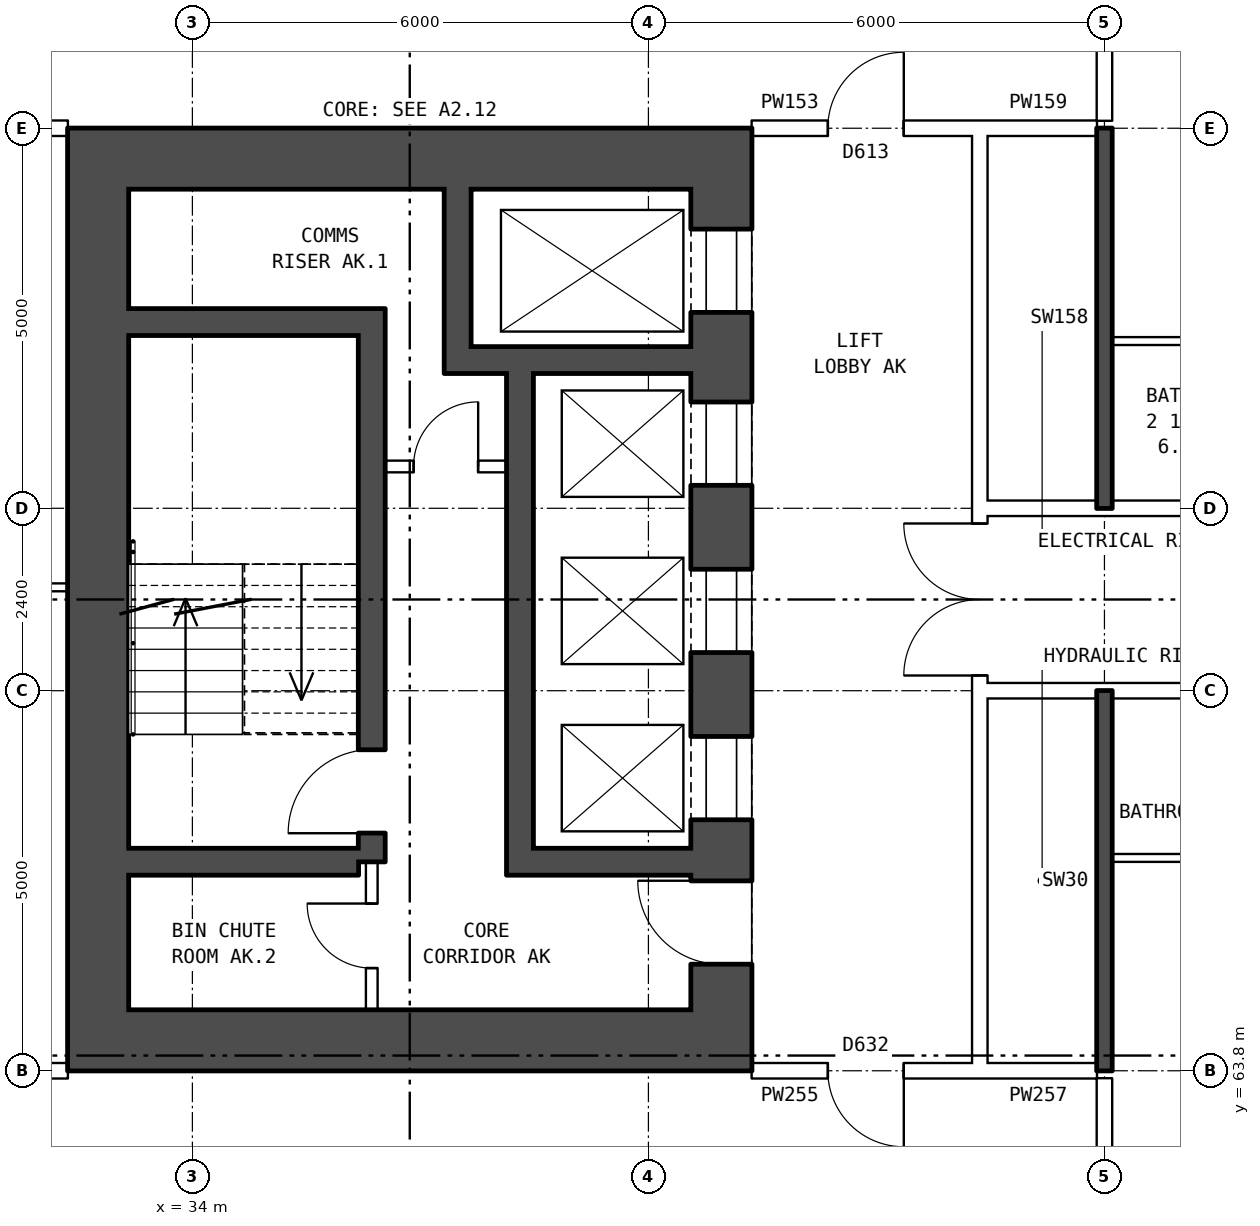
"""IFC4 building model, lengths in metres.
Left out: names, types, materials, properties, quantities, classifications, styles, units other than length and angle.
Written with IfcOpenShell. Run it as: python <this file> out.ifc"""

import sys

from ifc_helpers import new_model, si_unit, direction, frame, frame_2d, origin, place, context, subcontext, project, spatial, rectangle, extrude, element, fill, save


model = new_model("IFC4")
c1 = context("Model", 3, precision=1e-05, world=origin(), true_north=direction((0.0, 1.0)))
c2 = subcontext(c1, "Body", "Model", "MODEL_VIEW")
j1 = project(units=[si_unit("LENGTHUNIT", "METRE"), si_unit("PLANEANGLEUNIT", "RADIAN")], contexts=[c1])
p1 = place(None, origin())
s1 = spatial("IfcSite", under=j1, at=p1, CompositionType="ELEMENT")
p2 = place(p1, origin())
s2 = spatial("IfcBuilding", under=s1, at=p2, CompositionType="ELEMENT")
p3 = place(p2, frame((0.0, 0.0, 44.3)))
s3 = spatial("IfcBuildingStorey", under=s2, at=p3, CompositionType="ELEMENT", Elevation=44.3)
p4 = place(p3, frame((40.96, 75.4, 0.0), z_axis=(0.0, 0.0, 1.0), x_axis=(0.0, -1.0, 0.0)))
e1 = element("IfcWall", 1, at=p4, inside=s3, PredefinedType="SHEAR", context=c2, shape_type="SweptSolid", body=[
    extrude(rectangle(XDim=10.8, YDim=0.8, at=frame_2d((5.4, 0.0))), origin(), (0.0, 0.0, 1.0), 2.85),
])
p5 = place(p4, frame((0.525, 0.0, 0.0)))
e2 = element("IfcOpeningElement", 2, at=p5, cuts=e1, PredefinedType="OPENING", context=c2, shape_type="SweptSolid", body=[
    extrude(rectangle(XDim=1.1, YDim=2.1, at=frame_2d((0.55, 1.05))), frame((0.0, 0.41, 0.0), z_axis=(0.0, -1.0, 0.0), x_axis=(1.0, 0.0, 0.0)), (0.0, 0.0, 1.0), 0.82),
])
p6 = place(p4, frame((2.8, 0.0, 0.0)))
e3 = element("IfcOpeningElement", 3, at=p6, cuts=e1, PredefinedType="OPENING", context=c2, shape_type="SweptSolid", body=[
    extrude(rectangle(XDim=1.1, YDim=2.1, at=frame_2d((0.55, 1.05))), frame((0.0, 0.41, 0.0), z_axis=(0.0, -1.0, 0.0), x_axis=(1.0, 0.0, 0.0)), (0.0, 0.0, 1.0), 0.82),
])
p7 = place(p4, frame((5.0, 0.0, 0.0)))
e4 = element("IfcOpeningElement", 4, at=p7, cuts=e1, PredefinedType="OPENING", context=c2, shape_type="SweptSolid", body=[
    extrude(rectangle(XDim=1.1, YDim=2.1, at=frame_2d((0.55, 1.05))), frame((0.0, 0.41, 0.0), z_axis=(0.0, -1.0, 0.0), x_axis=(1.0, 0.0, 0.0)), (0.0, 0.0, 1.0), 0.82),
])
p8 = place(p4, frame((7.2, 0.0, 0.0)))
e5 = element("IfcOpeningElement", 5, at=p8, cuts=e1, PredefinedType="OPENING", context=c2, shape_type="SweptSolid", body=[
    extrude(rectangle(XDim=1.1, YDim=2.1, at=frame_2d((0.55, 1.05))), frame((0.0, 0.41, 0.0), z_axis=(0.0, -1.0, 0.0), x_axis=(1.0, 0.0, 0.0)), (0.0, 0.0, 1.0), 0.82),
])
p9 = place(p4, frame((9.1, 0.0, 0.0)))
e6 = element("IfcOpeningElement", 6, at=p9, cuts=e1, PredefinedType="OPENING", context=c2, shape_type="SweptSolid", body=[
    extrude(rectangle(XDim=1.1, YDim=2.1, at=frame_2d((0.55, 1.05))), frame((0.0, 0.41, 0.0), z_axis=(0.0, -1.0, 0.0), x_axis=(1.0, 0.0, 0.0)), (0.0, 0.0, 1.0), 0.82),
])
p10 = place(p3, frame((32.76, 75.4, 0.0), z_axis=(0.0, 0.0, 1.0), x_axis=(0.0, -1.0, 0.0)))
e7 = element("IfcWall", 7, at=p10, inside=s3, PredefinedType="SHEAR", context=c2, shape_type="SweptSolid", body=[
    extrude(rectangle(XDim=10.8, YDim=0.8, at=frame_2d((5.4, 0.0))), origin(), (0.0, 0.0, 1.0), 2.85),
])
for number, where, z_axis, x_axis in (
    (8, (41.36, 75.8, 0.0), (0.0, 0.0, 1.0), (-1.0, 0.0, 0.0)),
    (9, (41.36, 64.2, 0.0), (0.0, 0.0, 1.0), (-1.0, 0.0, 0.0)),
):
    element("IfcWall", number, at=place(p3, frame(where, z_axis=z_axis, x_axis=x_axis)), inside=s3, PredefinedType="SHEAR", context=c2, shape_type="SweptSolid", body=[
        extrude(rectangle(XDim=9.0, YDim=0.8, at=frame_2d((4.5, 0.0))), origin(), (0.0, 0.0, 1.0), 2.85),
    ])
p11 = place(p3, frame((36.185, 73.65, 0.0), z_axis=(0.0, 0.0, 1.0), x_axis=(-1.0, 0.0, 0.0)))
e10 = element("IfcWall", 10, at=p11, inside=s3, PredefinedType="SHEAR", context=c2, shape_type="SweptSolid", body=[
    extrude(rectangle(XDim=3.025, YDim=0.35, at=frame_2d((1.513, 0.0))), origin(), (0.0, 0.0, 1.0), 2.85),
])
p12 = place(p3, frame((40.56, 73.15, 0.0), z_axis=(0.0, 0.0, 1.0), x_axis=(-1.0, 0.0, 0.0)))
e11 = element("IfcWall", 11, at=p12, inside=s3, PredefinedType="SHEAR", context=c2, shape_type="SweptSolid", body=[
    extrude(rectangle(XDim=3.245, YDim=0.35, at=frame_2d((1.623, 0.0))), origin(), (0.0, 0.0, 1.0), 2.85),
])
p13 = place(p3, frame((38.135, 71.75, 0.0), z_axis=(0.0, 0.0, 1.0), x_axis=(-1.0, 0.0, 0.0)))
e12 = element("IfcWall", 12, at=p13, inside=s3, PredefinedType="PARTITIONING", context=c2, shape_type="SweptSolid", body=[
    extrude(rectangle(XDim=1.6, YDim=0.15, at=frame_2d((0.8, 0.0))), origin(), (0.0, 0.0, 1.0), 2.85),
])
p14 = place(p13, frame((0.375, 0.0, 0.0)))
e13 = element("IfcOpeningElement", 13, at=p14, cuts=e12, PredefinedType="OPENING", context=c2, shape_type="SweptSolid", body=[
    extrude(rectangle(XDim=0.85, YDim=2.1, at=frame_2d((0.425, 1.05))), frame((0.0, 0.085, 0.0), z_axis=(0.0, -1.0, 0.0), x_axis=(1.0, 0.0, 0.0)), (0.0, 0.0, 1.0), 0.17),
])
p15 = place(p3, frame((40.56, 66.55, 0.0), z_axis=(0.0, 0.0, 1.0), x_axis=(-1.0, 0.0, 0.0)))
e14 = element("IfcWall", 14, at=p15, inside=s3, PredefinedType="SHEAR", context=c2, shape_type="SweptSolid", body=[
    extrude(rectangle(XDim=2.075, YDim=0.35, at=frame_2d((1.038, 0.0))), origin(), (0.0, 0.0, 1.0), 2.85),
])
p16 = place(p3, frame((36.185, 66.55, 0.0), z_axis=(0.0, 0.0, 1.0), x_axis=(-1.0, 0.0, 0.0)))
e15 = element("IfcWall", 15, at=p16, inside=s3, PredefinedType="SHEAR", context=c2, shape_type="SweptSolid", body=[
    extrude(rectangle(XDim=3.025, YDim=0.35, at=frame_2d((1.513, 0.0))), origin(), (0.0, 0.0, 1.0), 2.85),
])
p17 = place(p3, frame((38.31, 72.975, 0.0), z_axis=(0.0, 0.0, 1.0), x_axis=(0.0, -1.0, 0.0)))
e16 = element("IfcWall", 16, at=p17, inside=s3, PredefinedType="SHEAR", context=c2, shape_type="SweptSolid", body=[
    extrude(rectangle(XDim=6.6, YDim=0.35, at=frame_2d((3.3, 0.0))), origin(), (0.0, 0.0, 1.0), 2.85),
])
p18 = place(p3, frame((37.49, 75.4, 0.0), z_axis=(0.0, 0.0, 1.0), x_axis=(0.0, -1.0, 0.0)))
e17 = element("IfcWall", 17, at=p18, inside=s3, PredefinedType="SHEAR", context=c2, shape_type="SweptSolid", body=[
    extrude(rectangle(XDim=2.075, YDim=0.35, at=frame_2d((1.038, 0.0))), origin(), (0.0, 0.0, 1.0), 2.85),
])
p19 = place(p3, frame((36.36, 73.825, 0.0), z_axis=(0.0, 0.0, 1.0), x_axis=(0.0, -1.0, 0.0)))
e18 = element("IfcWall", 18, at=p19, inside=s3, PredefinedType="SHEAR", context=c2, shape_type="SweptSolid", body=[
    extrude(rectangle(XDim=7.275, YDim=0.35, at=frame_2d((3.637, 0.0))), origin(), (0.0, 0.0, 1.0), 2.85),
])
p20 = place(p19, frame((5.8, 0.0, 0.0)))
e19 = element("IfcOpeningElement", 19, at=p20, cuts=e18, PredefinedType="OPENING", context=c2, shape_type="SweptSolid", body=[
    extrude(rectangle(XDim=1.1, YDim=2.1, at=frame_2d((0.55, 1.05))), frame((0.0, 0.185, 0.0), z_axis=(0.0, -1.0, 0.0), x_axis=(1.0, 0.0, 0.0)), (0.0, 0.0, 1.0), 0.37),
])
p21 = place(p3, frame((36.36, 66.55, 0.0), z_axis=(0.0, 0.0, 1.0), x_axis=(0.0, -1.0, 0.0)))
e20 = element("IfcWall", 20, at=p21, inside=s3, PredefinedType="PARTITIONING", context=c2, shape_type="SweptSolid", body=[
    extrude(rectangle(XDim=1.95, YDim=0.15, at=frame_2d((0.975, 0.0))), origin(), (0.0, 0.0, 1.0), 2.85),
])
p22 = place(p21, frame((0.55, 0.0, 0.0)))
e21 = element("IfcOpeningElement", 21, at=p22, cuts=e20, PredefinedType="OPENING", context=c2, shape_type="SweptSolid", body=[
    extrude(rectangle(XDim=0.85, YDim=2.1, at=frame_2d((0.425, 1.05))), frame((0.0, 0.085, 0.0), z_axis=(0.0, -1.0, 0.0), x_axis=(1.0, 0.0, 0.0)), (0.0, 0.0, 1.0), 0.17),
])
p23 = place(p3, frame((44.36, 63.9, 0.0), z_axis=(0.0, 0.0, 1.0), x_axis=(0.0, 1.0, 0.0)))
e22 = element("IfcWall", 22, at=p23, inside=s3, PredefinedType="PARTITIONING", context=c2, shape_type="SweptSolid", body=[
    extrude(rectangle(XDim=12.2, YDim=0.2, at=frame_2d((6.1, 0.0))), origin(), (0.0, 0.0, 1.0), 2.85),
])
p24 = place(p23, frame((5.1, 0.0, 0.0)))
e23 = element("IfcOpeningElement", 23, at=p24, cuts=e22, PredefinedType="OPENING", context=c2, shape_type="SweptSolid", body=[
    extrude(rectangle(XDim=2.0, YDim=2.1, at=frame_2d((1.0, 1.05))), frame((0.0, 0.11, 0.0), z_axis=(0.0, -1.0, 0.0), x_axis=(1.0, 0.0, 0.0)), (0.0, 0.0, 1.0), 0.22),
])
p25 = place(p3, frame((24.26, 63.8, 0.0), z_axis=(0.0, 0.0, 1.0), x_axis=(1.0, 0.0, 0.0)))
e24 = element("IfcWall", 24, at=p25, inside=s3, PredefinedType="PARTITIONING", context=c2, shape_type="SweptSolid", body=[
    extrude(rectangle(XDim=8.1, YDim=0.2, at=frame_2d((4.05, 0.0))), origin(), (0.0, 0.0, 1.0), 2.85),
])
p26 = place(p25, frame((5.52, 0.0, 0.0)))
e25 = element("IfcOpeningElement", 25, at=p26, cuts=e24, PredefinedType="OPENING", context=c2, shape_type="SweptSolid", body=[
    extrude(rectangle(XDim=0.8, YDim=2.1, at=frame_2d((0.4, 1.05))), frame((0.0, 0.11, 0.0), z_axis=(0.0, -1.0, 0.0), x_axis=(1.0, 0.0, 0.0)), (0.0, 0.0, 1.0), 0.22),
])
p27 = place(p3, frame((41.36, 63.8, 0.0), z_axis=(0.0, 0.0, 1.0), x_axis=(1.0, 0.0, 0.0)))
e26 = element("IfcWall", 26, at=p27, inside=s3, PredefinedType="PARTITIONING", context=c2, shape_type="SweptSolid", body=[
    extrude(rectangle(XDim=3.0, YDim=0.2, at=frame_2d((1.5, 0.0))), origin(), (0.0, 0.0, 1.0), 2.85),
])
p28 = place(p27, frame((1.0, 0.0, 0.0)))
e27 = element("IfcOpeningElement", 27, at=p28, cuts=e26, PredefinedType="OPENING", context=c2, shape_type="SweptSolid", body=[
    extrude(rectangle(XDim=1.0, YDim=2.1, at=frame_2d((0.5, 1.05))), frame((0.0, 0.11, 0.0), z_axis=(0.0, -1.0, 0.0), x_axis=(1.0, 0.0, 0.0)), (0.0, 0.0, 1.0), 0.22),
])
p29 = place(p3, frame((44.36, 63.8, 0.0), z_axis=(0.0, 0.0, 1.0), x_axis=(1.0, 0.0, 0.0)))
e28 = element("IfcWall", 28, at=p29, inside=s3, PredefinedType="PARTITIONING", context=c2, shape_type="SweptSolid", body=[
    extrude(rectangle(XDim=1.54, YDim=0.2, at=frame_2d((0.77, 0.0))), origin(), (0.0, 0.0, 1.0), 2.85),
])
p30 = place(p3, frame((46.1, 66.6, 0.0), z_axis=(0.0, 0.0, 1.0), x_axis=(1.0, 0.0, 0.0)))
e29 = element("IfcWall", 29, at=p30, inside=s3, PredefinedType="PARTITIONING", context=c2, shape_type="SweptSolid", body=[
    extrude(rectangle(XDim=2.9, YDim=0.1, at=frame_2d((1.45, 0.0))), origin(), (0.0, 0.0, 1.0), 2.85),
])
p31 = place(p3, frame((44.36, 68.8, 0.0), z_axis=(0.0, 0.0, 1.0), x_axis=(1.0, 0.0, 0.0)))
e30 = element("IfcWall", 30, at=p31, inside=s3, PredefinedType="PARTITIONING", context=c2, shape_type="SweptSolid", body=[
    extrude(rectangle(XDim=19.28, YDim=0.2, at=frame_2d((9.64, 0.0))), origin(), (0.0, 0.0, 1.0), 2.85),
])
p32 = place(p31, frame((14.64, 0.0, 0.0)))
e31 = element("IfcOpeningElement", 31, at=p32, cuts=e30, PredefinedType="OPENING", context=c2, shape_type="SweptSolid", body=[
    extrude(rectangle(XDim=1.0, YDim=2.1, at=frame_2d((0.5, 1.05))), frame((0.0, 0.11, 0.0), z_axis=(0.0, -1.0, 0.0), x_axis=(1.0, 0.0, 0.0)), (0.0, 0.0, 1.0), 0.22),
])
p33 = place(p31, frame((5.64, 0.0, 0.0)))
e32 = element("IfcOpeningElement", 32, at=p33, cuts=e30, PredefinedType="OPENING", context=c2, shape_type="SweptSolid", body=[
    extrude(rectangle(XDim=1.0, YDim=2.1, at=frame_2d((0.5, 1.05))), frame((0.0, 0.11, 0.0), z_axis=(0.0, -1.0, 0.0), x_axis=(1.0, 0.0, 0.0)), (0.0, 0.0, 1.0), 0.22),
])
p34 = place(p3, frame((28.1, 70.16, 0.0), z_axis=(0.0, 0.0, 1.0), x_axis=(1.0, 0.0, 0.0)))
e33 = element("IfcWall", 33, at=p34, inside=s3, PredefinedType="PARTITIONING", context=c2, shape_type="SweptSolid", body=[
    extrude(rectangle(XDim=4.26, YDim=0.1, at=frame_2d((2.13, 0.0))), origin(), (0.0, 0.0, 1.0), 2.85),
])
p35 = place(p3, frame((44.36, 71.2, 0.0), z_axis=(0.0, 0.0, 1.0), x_axis=(1.0, 0.0, 0.0)))
e34 = element("IfcWall", 34, at=p35, inside=s3, PredefinedType="PARTITIONING", context=c2, shape_type="SweptSolid", body=[
    extrude(rectangle(XDim=19.28, YDim=0.2, at=frame_2d((9.64, 0.0))), origin(), (0.0, 0.0, 1.0), 2.85),
])
p36 = place(p35, frame((14.64, 0.0, 0.0)))
e35 = element("IfcOpeningElement", 35, at=p36, cuts=e34, PredefinedType="OPENING", context=c2, shape_type="SweptSolid", body=[
    extrude(rectangle(XDim=1.0, YDim=2.1, at=frame_2d((0.5, 1.05))), frame((0.0, 0.11, 0.0), z_axis=(0.0, -1.0, 0.0), x_axis=(1.0, 0.0, 0.0)), (0.0, 0.0, 1.0), 0.22),
])
p37 = place(p35, frame((5.64, 0.0, 0.0)))
e36 = element("IfcOpeningElement", 36, at=p37, cuts=e34, PredefinedType="OPENING", context=c2, shape_type="SweptSolid", body=[
    extrude(rectangle(XDim=1.0, YDim=2.1, at=frame_2d((0.5, 1.05))), frame((0.0, 0.11, 0.0), z_axis=(0.0, -1.0, 0.0), x_axis=(1.0, 0.0, 0.0)), (0.0, 0.0, 1.0), 0.22),
])
p38 = place(p3, frame((46.1, 73.4, 0.0), z_axis=(0.0, 0.0, 1.0), x_axis=(1.0, 0.0, 0.0)))
e37 = element("IfcWall", 37, at=p38, inside=s3, PredefinedType="PARTITIONING", context=c2, shape_type="SweptSolid", body=[
    extrude(rectangle(XDim=2.9, YDim=0.1, at=frame_2d((1.45, 0.0))), origin(), (0.0, 0.0, 1.0), 2.85),
])
p39 = place(p3, frame((24.26, 76.2, 0.0), z_axis=(0.0, 0.0, 1.0), x_axis=(1.0, 0.0, 0.0)))
e38 = element("IfcWall", 38, at=p39, inside=s3, PredefinedType="PARTITIONING", context=c2, shape_type="SweptSolid", body=[
    extrude(rectangle(XDim=8.1, YDim=0.2, at=frame_2d((4.05, 0.0))), origin(), (0.0, 0.0, 1.0), 2.85),
])
p40 = place(p39, frame((5.52, 0.0, 0.0)))
e39 = element("IfcOpeningElement", 39, at=p40, cuts=e38, PredefinedType="OPENING", context=c2, shape_type="SweptSolid", body=[
    extrude(rectangle(XDim=0.8, YDim=2.1, at=frame_2d((0.4, 1.05))), frame((0.0, 0.11, 0.0), z_axis=(0.0, -1.0, 0.0), x_axis=(1.0, 0.0, 0.0)), (0.0, 0.0, 1.0), 0.22),
])
p41 = place(p3, frame((41.36, 76.2, 0.0), z_axis=(0.0, 0.0, 1.0), x_axis=(1.0, 0.0, 0.0)))
e40 = element("IfcWall", 40, at=p41, inside=s3, PredefinedType="PARTITIONING", context=c2, shape_type="SweptSolid", body=[
    extrude(rectangle(XDim=3.0, YDim=0.2, at=frame_2d((1.5, 0.0))), origin(), (0.0, 0.0, 1.0), 2.85),
])
p42 = place(p41, frame((1.0, 0.0, 0.0)))
e41 = element("IfcOpeningElement", 41, at=p42, cuts=e40, PredefinedType="OPENING", context=c2, shape_type="SweptSolid", body=[
    extrude(rectangle(XDim=1.0, YDim=2.1, at=frame_2d((0.5, 1.05))), frame((0.0, 0.11, 0.0), z_axis=(0.0, -1.0, 0.0), x_axis=(1.0, 0.0, 0.0)), (0.0, 0.0, 1.0), 0.22),
])
p43 = place(p3, frame((44.36, 76.2, 0.0), z_axis=(0.0, 0.0, 1.0), x_axis=(1.0, 0.0, 0.0)))
e42 = element("IfcWall", 42, at=p43, inside=s3, PredefinedType="PARTITIONING", context=c2, shape_type="SweptSolid", body=[
    extrude(rectangle(XDim=1.54, YDim=0.2, at=frame_2d((0.77, 0.0))), origin(), (0.0, 0.0, 1.0), 2.85),
])
p44 = place(p3, frame((46.0, 61.5, 0.0), z_axis=(0.0, 0.0, 1.0), x_axis=(0.0, 1.0, 0.0)))
e43 = element("IfcWall", 43, at=p44, inside=s3, PredefinedType="PARTITIONING", context=c2, shape_type="SweptSolid", body=[
    extrude(rectangle(XDim=2.2, YDim=0.2, at=frame_2d((1.1, 0.0))), origin(), (0.0, 0.0, 1.0), 2.85),
])
for number, where, z_axis, x_axis in (
    (44, (46.0, 63.8, 0.0), (0.0, 0.0, 1.0), (0.0, 1.0, 0.0)),
    (45, (46.0, 71.2, 0.0), (0.0, 0.0, 1.0), (0.0, 1.0, 0.0)),
):
    element("IfcWall", number, at=place(p3, frame(where, z_axis=z_axis, x_axis=x_axis)), inside=s3, PredefinedType="SOLIDWALL", context=c2, shape_type="SweptSolid", body=[
        extrude(rectangle(XDim=5.0, YDim=0.2, at=frame_2d((2.5, 0.0))), origin(), (0.0, 0.0, 1.0), 2.85),
    ])
p45 = place(p3, frame((46.0, 76.3, 0.0), z_axis=(0.0, 0.0, 1.0), x_axis=(0.0, 1.0, 0.0)))
e46 = element("IfcWall", 46, at=p45, inside=s3, PredefinedType="PARTITIONING", context=c2, shape_type="SweptSolid", body=[
    extrude(rectangle(XDim=2.2, YDim=0.2, at=frame_2d((1.1, 0.0))), origin(), (0.0, 0.0, 1.0), 2.85),
])
p46 = place(p5, origin())
e47 = element("IfcDoor", 47, at=p46, inside=s3, OperationType="DOUBLE_DOOR_SLIDING", PredefinedType="DOOR", context=c2, shape_type="SweptSolid", body=[
    extrude(rectangle(XDim=1.1, YDim=2.1, at=frame_2d((0.55, 1.05))), frame((0.0, -0.335, 0.0), z_axis=(0.0, -1.0, 0.0), x_axis=(1.0, 0.0, 0.0)), (0.0, 0.0, 1.0), 0.05),
])
fill(e2, e47)
p47 = place(p6, origin())
e48 = element("IfcDoor", 48, at=p47, inside=s3, OperationType="DOUBLE_DOOR_SLIDING", PredefinedType="DOOR", context=c2, shape_type="SweptSolid", body=[
    extrude(rectangle(XDim=1.1, YDim=2.1, at=frame_2d((0.55, 1.05))), frame((0.0, -0.335, 0.0), z_axis=(0.0, -1.0, 0.0), x_axis=(1.0, 0.0, 0.0)), (0.0, 0.0, 1.0), 0.05),
])
fill(e3, e48)
p48 = place(p7, origin())
e49 = element("IfcDoor", 49, at=p48, inside=s3, OperationType="DOUBLE_DOOR_SLIDING", PredefinedType="DOOR", context=c2, shape_type="SweptSolid", body=[
    extrude(rectangle(XDim=1.1, YDim=2.1, at=frame_2d((0.55, 1.05))), frame((0.0, -0.335, 0.0), z_axis=(0.0, -1.0, 0.0), x_axis=(1.0, 0.0, 0.0)), (0.0, 0.0, 1.0), 0.05),
])
fill(e4, e49)
p49 = place(p8, origin())
e50 = element("IfcDoor", 50, at=p49, inside=s3, OperationType="DOUBLE_DOOR_SLIDING", PredefinedType="DOOR", context=c2, shape_type="SweptSolid", body=[
    extrude(rectangle(XDim=1.1, YDim=2.1, at=frame_2d((0.55, 1.05))), frame((0.0, -0.335, 0.0), z_axis=(0.0, -1.0, 0.0), x_axis=(1.0, 0.0, 0.0)), (0.0, 0.0, 1.0), 0.05),
])
fill(e5, e50)
p50 = place(p9, frame((1.1, 0.0, 0.0), z_axis=(0.0, 0.0, 1.0), x_axis=(-1.0, 0.0, 0.0)))
e51 = element("IfcDoor", 51, at=p50, inside=s3, OperationType="SINGLE_SWING_RIGHT", PredefinedType="DOOR", context=c2, shape_type="SweptSolid", body=[
    extrude(rectangle(XDim=1.1, YDim=2.1, at=frame_2d((0.55, 1.05))), frame((0.0, 0.385, 0.0), z_axis=(0.0, -1.0, 0.0), x_axis=(1.0, 0.0, 0.0)), (0.0, 0.0, 1.0), 0.05),
])
fill(e6, e51)
p51 = place(p20, frame((1.1, 0.0, 0.0), z_axis=(0.0, 0.0, 1.0), x_axis=(-1.0, 0.0, 0.0)))
e52 = element("IfcDoor", 52, at=p51, inside=s3, OperationType="SINGLE_SWING_LEFT", PredefinedType="DOOR", context=c2, shape_type="SweptSolid", body=[
    extrude(rectangle(XDim=1.1, YDim=2.1, at=frame_2d((0.55, 1.05))), frame((0.0, 0.025, 0.0), z_axis=(0.0, -1.0, 0.0), x_axis=(1.0, 0.0, 0.0)), (0.0, 0.0, 1.0), 0.05),
])
fill(e19, e52)
p52 = place(p14, frame((0.85, 0.0, 0.0), z_axis=(0.0, 0.0, 1.0), x_axis=(-1.0, 0.0, 0.0)))
e53 = element("IfcDoor", 53, at=p52, inside=s3, OperationType="SINGLE_SWING_RIGHT", PredefinedType="DOOR", context=c2, shape_type="SweptSolid", body=[
    extrude(rectangle(XDim=0.85, YDim=2.1, at=frame_2d((0.425, 1.05))), frame((0.0, 0.025, 0.0), z_axis=(0.0, -1.0, 0.0), x_axis=(1.0, 0.0, 0.0)), (0.0, 0.0, 1.0), 0.05),
])
fill(e13, e53)
p53 = place(p22, frame((0.85, 0.0, 0.0), z_axis=(0.0, 0.0, 1.0), x_axis=(-1.0, 0.0, 0.0)))
e54 = element("IfcDoor", 54, at=p53, inside=s3, OperationType="SINGLE_SWING_RIGHT", PredefinedType="DOOR", context=c2, shape_type="SweptSolid", body=[
    extrude(rectangle(XDim=0.85, YDim=2.1, at=frame_2d((0.425, 1.05))), frame((0.0, 0.025, 0.0), z_axis=(0.0, -1.0, 0.0), x_axis=(1.0, 0.0, 0.0)), (0.0, 0.0, 1.0), 0.05),
])
fill(e21, e54)
p54 = place(p24, origin())
e55 = element("IfcDoor", 55, at=p54, inside=s3, OperationType="DOUBLE_DOOR_SINGLE_SWING", PredefinedType="DOOR", context=c2, shape_type="SweptSolid", body=[
    extrude(rectangle(XDim=2.0, YDim=2.1, at=frame_2d((1.0, 1.05))), frame((0.0, 0.025, 0.0), z_axis=(0.0, -1.0, 0.0), x_axis=(1.0, 0.0, 0.0)), (0.0, 0.0, 1.0), 0.05),
])
fill(e23, e55)
p55 = place(p28, frame((1.0, 0.0, 0.0), z_axis=(0.0, 0.0, 1.0), x_axis=(-1.0, 0.0, 0.0)))
e56 = element("IfcDoor", 56, at=p55, inside=s3, OperationType="SINGLE_SWING_LEFT", PredefinedType="DOOR", context=c2, shape_type="SweptSolid", body=[
    extrude(rectangle(XDim=1.0, YDim=2.1, at=frame_2d((0.5, 1.05))), frame((0.0, 0.025, 0.0), z_axis=(0.0, -1.0, 0.0), x_axis=(1.0, 0.0, 0.0)), (0.0, 0.0, 1.0), 0.05),
])
fill(e27, e56)
p56 = place(p42, origin())
e57 = element("IfcDoor", 57, at=p56, inside=s3, OperationType="SINGLE_SWING_RIGHT", PredefinedType="DOOR", context=c2, shape_type="SweptSolid", body=[
    extrude(rectangle(XDim=1.0, YDim=2.1, at=frame_2d((0.5, 1.05))), frame((0.0, 0.025, 0.0), z_axis=(0.0, -1.0, 0.0), x_axis=(1.0, 0.0, 0.0)), (0.0, 0.0, 1.0), 0.05),
])
fill(e41, e57)
save(model, sys.argv[1])
